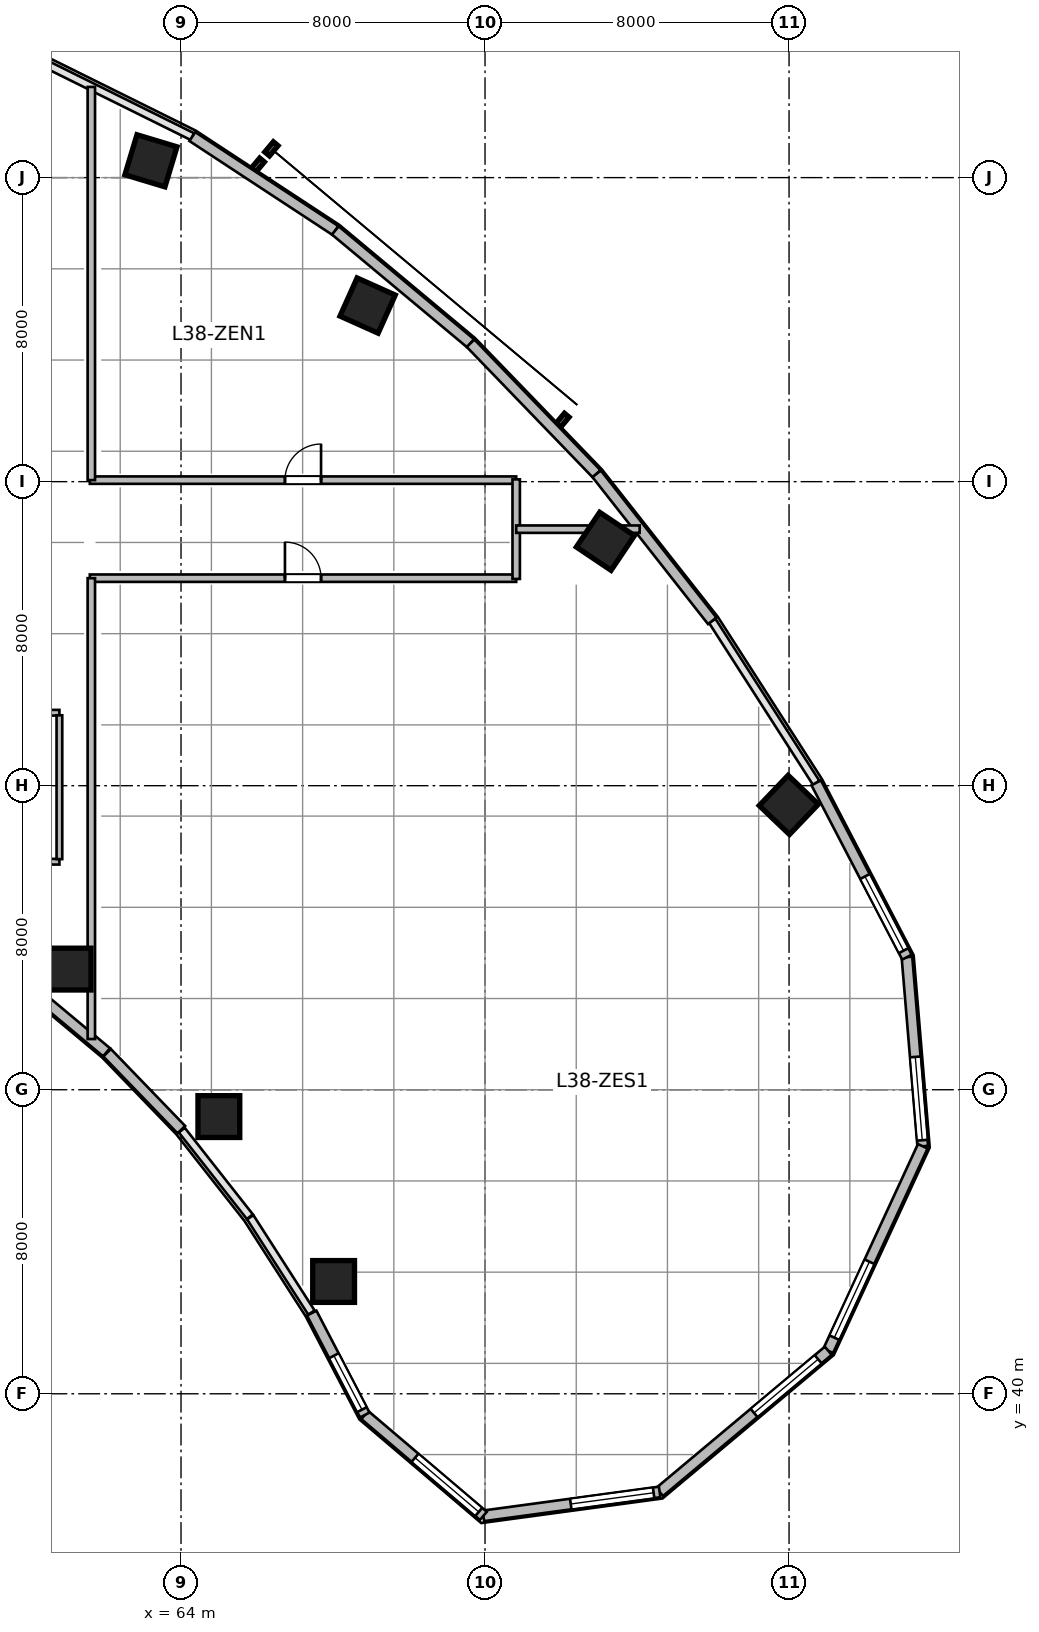
"""IFC4 building model, lengths in metres.
Left out: names, types, materials, properties, quantities, classifications, styles, units other than length and angle.
Written with IfcOpenShell. Run it as: python <this file> out.ifc"""

import sys

from ifc_helpers import new_model, si_unit, direction, frame, frame_2d, origin, origin_2d, place, context, subcontext, project, spatial, rectangle, circle, extrude, source, transform, mapped, element, fill, save


model = new_model("IFC4")
c1 = context("Model", 3, precision=1e-05, world=origin(), true_north=direction((0.0, 1.0)))
c2 = subcontext(c1, "Body", "Model", "MODEL_VIEW")
j1 = project(units=[si_unit("LENGTHUNIT", "METRE"), si_unit("PLANEANGLEUNIT", "RADIAN")], contexts=[c1])
p1 = place(None, origin())
s1 = spatial("IfcSite", under=j1, at=p1, CompositionType="ELEMENT")
p2 = place(p1, origin())
s2 = spatial("IfcBuilding", under=s1, at=p2, CompositionType="ELEMENT")
p3 = place(p2, frame((0.0, 0.0, 158.4)))
s3 = spatial("IfcBuildingStorey", under=s2, at=p3, CompositionType="ELEMENT", Elevation=158.4)
m1 = source(origin(), c2, "Body", "SweptSolid", [
    extrude(rectangle(XDim=1.1, YDim=1.1, at=origin_2d()), origin(), (0.0, 0.0, 1.0), 3.9),
])
p4 = place(p3, frame((63.209, 72.442, 0.0), z_axis=(0.0, 0.0, 1.0), x_axis=(0.288697611798, 0.957420330337, 0.0)))
e1 = element("IfcColumn", 1, at=p4, inside=s3, PredefinedType="COLUMN", context=c2, shape_type="MappedRepresentation", body=[
    mapped(m1, transform((0.0, 0.0, 0.0), scale=1.0)),
])
m2 = source(origin(), c2, "Body", "SweptSolid", [
    extrude(circle(Radius=0.55, at=origin_2d()), origin(), (0.0, 0.0, 1.0), 3.9),
])
p5 = place(p3, frame((61.082, 51.175, 0.0), z_axis=(0.0, 0.0, 1.0), x_axis=(0.409126902895, 0.912477494148, 0.0)))
e2 = element("IfcColumn", 2, at=p5, inside=s3, PredefinedType="COLUMN", context=c2, shape_type="MappedRepresentation", body=[
    mapped(m2, transform((0.0, 0.0, 0.0), scale=1.0)),
])
p6 = place(p3, frame((68.91, 68.633, 0.0), z_axis=(0.0, 0.0, 1.0), x_axis=(0.409126902895, 0.912477494148, 0.0)))
e3 = element("IfcColumn", 3, at=p6, inside=s3, PredefinedType="COLUMN", context=c2, shape_type="MappedRepresentation", body=[
    mapped(m1, transform((0.0, 0.0, 0.0), scale=1.0)),
])
p7 = place(p3, frame((64.996, 47.294, 0.0), z_axis=(0.0, 0.0, 1.0), x_axis=(0.55774510898, 0.830012285095, 0.0)))
e4 = element("IfcColumn", 4, at=p7, inside=s3, PredefinedType="COLUMN", context=c2, shape_type="MappedRepresentation", body=[
    mapped(m2, transform((0.0, 0.0, 0.0), scale=1.0)),
])
p8 = place(p3, frame((75.167, 62.43, 0.0), z_axis=(0.0, 0.0, 1.0), x_axis=(0.55774510898, 0.830012285095, 0.0)))
e5 = element("IfcColumn", 5, at=p8, inside=s3, PredefinedType="COLUMN", context=c2, shape_type="MappedRepresentation", body=[
    mapped(m1, transform((0.0, 0.0, 0.0), scale=1.0)),
])
p9 = place(p3, frame((68.015, 42.955, 0.0), z_axis=(0.0, 0.0, 1.0), x_axis=(0.690756218984, 0.723087716626, 0.0)))
e6 = element("IfcColumn", 6, at=p9, inside=s3, PredefinedType="COLUMN", context=c2, shape_type="MappedRepresentation", body=[
    mapped(m2, transform((0.0, 0.0, 0.0), scale=1.0)),
])
p10 = place(p3, frame((79.993, 55.494, 0.0), z_axis=(0.0, 0.0, 1.0), x_axis=(0.690756218984, 0.723087716626, 0.0)))
e7 = element("IfcColumn", 7, at=p10, inside=s3, PredefinedType="COLUMN", context=c2, shape_type="MappedRepresentation", body=[
    mapped(m1, transform((0.0, 0.0, 0.0), scale=1.0)),
])
m3 = source(origin(), c2, "Body", "SweptSolid", [
    extrude(rectangle(XDim=4.994, YDim=0.28, at=frame_2d((2.497, 0.0))), origin(), (0.0, 0.0, 1.0), 3.65),
])
p11 = place(p3, frame((83.102, 51.489, 0.0), z_axis=(0.0, 0.0, 1.0), x_axis=(0.083344839916, -0.996520766296, 0.0)))
e8 = element("IfcWall", 8, at=p11, inside=s3, PredefinedType="SOLIDWALL", context=c2, shape_type="MappedRepresentation", body=[
    mapped(m3, transform((0.0, 0.0, 0.0), scale=1.0)),
])
p12 = place(p11, frame((2.635, 0.0, 0.95)))
e9 = element("IfcOpeningElement", 9, at=p12, cuts=e8, PredefinedType="OPENING", context=c2, shape_type="SweptSolid", body=[
    extrude(rectangle(XDim=2.2, YDim=2.1, at=frame_2d((1.1, 1.05))), frame((0.0, 0.15, 0.0), z_axis=(0.0, -1.0, 0.0), x_axis=(1.0, 0.0, 0.0)), (0.0, 0.0, 1.0), 0.3),
])
m4 = source(origin(), c2, "Body", "SweptSolid", [
    extrude(rectangle(XDim=5.927, YDim=0.28, at=frame_2d((2.964, 0.0))), origin(), (0.0, 0.0, 1.0), 3.65),
])
p13 = place(p3, frame((83.519, 46.512, 0.0), z_axis=(0.0, 0.0, 1.0), x_axis=(-0.419656204795, -0.907683132914, 0.0)))
e10 = element("IfcWall", 10, at=p13, inside=s3, PredefinedType="SOLIDWALL", context=c2, shape_type="MappedRepresentation", body=[
    mapped(m4, transform((0.0, 0.0, 0.0), scale=1.0)),
])
p14 = place(p13, frame((3.346, 0.0, 0.95)))
e11 = element("IfcOpeningElement", 11, at=p14, cuts=e10, PredefinedType="OPENING", context=c2, shape_type="SweptSolid", body=[
    extrude(rectangle(XDim=2.2, YDim=2.1, at=frame_2d((1.1, 1.05))), frame((0.0, 0.15, 0.0), z_axis=(0.0, -1.0, 0.0), x_axis=(1.0, 0.0, 0.0)), (0.0, 0.0, 1.0), 0.3),
])
m5 = source(origin(), c2, "Body", "SweptSolid", [
    extrude(rectangle(XDim=5.786, YDim=0.28, at=frame_2d((2.893, 0.0))), origin(), (0.0, 0.0, 1.0), 3.65),
])
p15 = place(p3, frame((81.031, 41.131, 0.0), z_axis=(0.0, 0.0, 1.0), x_axis=(-0.766711306852, -0.641992034176, 0.0)))
e12 = element("IfcWall", 12, at=p15, inside=s3, PredefinedType="SOLIDWALL", context=c2, shape_type="MappedRepresentation", body=[
    mapped(m5, transform((0.0, 0.0, 0.0), scale=1.0)),
])
p16 = place(p15, frame((0.347, 0.0, 0.95)))
e13 = element("IfcOpeningElement", 13, at=p16, cuts=e12, PredefinedType="OPENING", context=c2, shape_type="SweptSolid", body=[
    extrude(rectangle(XDim=2.2, YDim=2.1, at=frame_2d((1.1, 1.05))), frame((0.0, 0.15, 0.0), z_axis=(0.0, -1.0, 0.0), x_axis=(1.0, 0.0, 0.0)), (0.0, 0.0, 1.0), 0.3),
])
m6 = source(origin(), c2, "Body", "SweptSolid", [
    extrude(rectangle(XDim=4.68, YDim=0.28, at=frame_2d((2.34, 0.0))), origin(), (0.0, 0.0, 1.0), 3.65),
])
p17 = place(p3, frame((76.594, 37.417, 0.0), z_axis=(0.0, 0.0, 1.0), x_axis=(-0.990931146435, -0.134370618162, 0.0)))
e14 = element("IfcWall", 14, at=p17, inside=s3, PredefinedType="SOLIDWALL", context=c2, shape_type="MappedRepresentation", body=[
    mapped(m6, transform((0.0, 0.0, 0.0), scale=1.0)),
])
p18 = place(p17, frame((0.16, 0.0, 0.95)))
e15 = element("IfcOpeningElement", 15, at=p18, cuts=e14, PredefinedType="OPENING", context=c2, shape_type="SweptSolid", body=[
    extrude(rectangle(XDim=2.2, YDim=2.1, at=frame_2d((1.1, 1.05))), frame((0.0, 0.15, 0.0), z_axis=(0.0, -1.0, 0.0), x_axis=(1.0, 0.0, 0.0)), (0.0, 0.0, 1.0), 0.3),
])
m7 = source(origin(), c2, "Body", "SweptSolid", [
    extrude(rectangle(XDim=4.096, YDim=0.28, at=frame_2d((2.048, 0.0))), origin(), (0.0, 0.0, 1.0), 3.65),
])
p19 = place(p3, frame((71.957, 36.788, 0.0), z_axis=(0.0, 0.0, 1.0), x_axis=(-0.761926081737, 0.647663991564, 0.0)))
e16 = element("IfcWall", 16, at=p19, inside=s3, PredefinedType="SOLIDWALL", context=c2, shape_type="MappedRepresentation", body=[
    mapped(m7, transform((0.0, 0.0, 0.0), scale=1.0)),
])
p20 = place(p19, frame((0.16, 0.0, 0.95)))
e17 = element("IfcOpeningElement", 17, at=p20, cuts=e16, PredefinedType="OPENING", context=c2, shape_type="SweptSolid", body=[
    extrude(rectangle(XDim=2.2, YDim=2.1, at=frame_2d((1.1, 1.05))), frame((0.0, 0.15, 0.0), z_axis=(0.0, -1.0, 0.0), x_axis=(1.0, 0.0, 0.0)), (0.0, 0.0, 1.0), 0.3),
])
m8 = source(origin(), c2, "Body", "SweptSolid", [
    extrude(rectangle(XDim=3.024, YDim=0.28, at=frame_2d((1.512, 0.0))), origin(), (0.0, 0.0, 1.0), 3.65),
])
p21 = place(p3, frame((68.836, 39.44, 0.0), z_axis=(0.0, 0.0, 1.0), x_axis=(-0.461718746531, 0.887026380161, 0.0)))
e18 = element("IfcWall", 18, at=p21, inside=s3, PredefinedType="SOLIDWALL", context=c2, shape_type="MappedRepresentation", body=[
    mapped(m8, transform((0.0, 0.0, 0.0), scale=1.0)),
])
p22 = place(p21, frame((0.16, 0.0, 0.95)))
e19 = element("IfcOpeningElement", 19, at=p22, cuts=e18, PredefinedType="OPENING", context=c2, shape_type="SweptSolid", body=[
    extrude(rectangle(XDim=1.6, YDim=1.9, at=frame_2d((0.8, 0.95))), frame((0.0, 0.15, 0.0), z_axis=(0.0, -1.0, 0.0), x_axis=(1.0, 0.0, 0.0)), (0.0, 0.0, 1.0), 0.3),
])
m9 = source(origin(), c2, "Body", "SweptSolid", [
    extrude(rectangle(XDim=2.812, YDim=0.28, at=frame_2d((1.406, 0.0))), origin(), (0.0, 0.0, 1.0), 3.65),
])
p23 = place(p3, frame((64.008, 46.95, 0.0), z_axis=(0.0, 0.0, 1.0), x_axis=(-0.694583668785, 0.719411931411, 0.0)))
e20 = element("IfcWall", 20, at=p23, inside=s3, PredefinedType="SOLIDWALL", context=c2, shape_type="MappedRepresentation", body=[
    mapped(m9, transform((0.0, 0.0, 0.0), scale=1.0)),
])
m10 = source(origin(), c2, "Body", "SweptSolid", [
    extrude(rectangle(XDim=2.729, YDim=0.28, at=frame_2d((1.365, 0.0))), origin(), (0.0, 0.0, 1.0), 3.65),
])
p24 = place(p3, frame((62.041, 48.987, 0.0), z_axis=(0.0, 0.0, 1.0), x_axis=(-0.767957284255, 0.640501061326, 0.0)))
e21 = element("IfcWall", 21, at=p24, inside=s3, PredefinedType="SOLIDWALL", context=c2, shape_type="MappedRepresentation", body=[
    mapped(m10, transform((0.0, 0.0, 0.0), scale=1.0)),
])
m11 = source(origin(), c2, "Body", "SweptSolid", [
    extrude(rectangle(XDim=4.501, YDim=0.28, at=frame_2d((2.25, 0.0))), origin(), (0.0, 0.0, 1.0), 3.65),
])
p25 = place(p3, frame((64.298, 73.08, 0.0), z_axis=(0.0, 0.0, 1.0), x_axis=(0.835984920737, -0.548752414391, 0.0)))
e22 = element("IfcWall", 22, at=p25, inside=s3, PredefinedType="SOLIDWALL", context=c2, shape_type="MappedRepresentation", body=[
    mapped(m11, transform((0.0, 0.0, 0.0), scale=1.0)),
])
m12 = source(origin(), c2, "Body", "SweptSolid", [
    extrude(rectangle(XDim=4.634, YDim=0.28, at=frame_2d((2.317, 0.0))), origin(), (0.0, 0.0, 1.0), 3.65),
])
p26 = place(p3, frame((68.061, 70.61, 0.0), z_axis=(0.0, 0.0, 1.0), x_axis=(0.767910229096, -0.640557475993, 0.0)))
e23 = element("IfcWall", 23, at=p26, inside=s3, PredefinedType="SOLIDWALL", context=c2, shape_type="MappedRepresentation", body=[
    mapped(m12, transform((0.0, 0.0, 0.0), scale=1.0)),
])
m13 = source(origin(), c2, "Body", "SweptSolid", [
    extrude(rectangle(XDim=4.776, YDim=0.28, at=frame_2d((2.388, 0.0))), origin(), (0.0, 0.0, 1.0), 3.65),
])
p27 = place(p3, frame((71.619, 67.642, 0.0), z_axis=(0.0, 0.0, 1.0), x_axis=(0.694601811851, -0.719394414055, 0.0)))
e24 = element("IfcWall", 24, at=p27, inside=s3, PredefinedType="SOLIDWALL", context=c2, shape_type="MappedRepresentation", body=[
    mapped(m13, transform((0.0, 0.0, 0.0), scale=1.0)),
])
m14 = source(origin(), c2, "Body", "SweptSolid", [
    extrude(rectangle(XDim=4.922, YDim=0.28, at=frame_2d((2.461, 0.0))), origin(), (0.0, 0.0, 1.0), 3.65),
])
p28 = place(p3, frame((74.936, 64.206, 0.0), z_axis=(0.0, 0.0, 1.0), x_axis=(0.61817639101, -0.786039407153, 0.0)))
e25 = element("IfcWall", 25, at=p28, inside=s3, PredefinedType="SOLIDWALL", context=c2, shape_type="MappedRepresentation", body=[
    mapped(m14, transform((0.0, 0.0, 0.0), scale=1.0)),
])
m15 = source(origin(), c2, "Body", "SweptSolid", [
    extrude(rectangle(XDim=5.171, YDim=0.28, at=frame_2d((2.585, 0.0))), origin(), (0.0, 0.0, 1.0), 3.65),
])
p29 = place(p3, frame((80.715, 56.075, 0.0), z_axis=(0.0, 0.0, 1.0), x_axis=(0.461752581363, -0.887008767491, 0.0)))
e26 = element("IfcWall", 26, at=p29, inside=s3, PredefinedType="SOLIDWALL", context=c2, shape_type="MappedRepresentation", body=[
    mapped(m15, transform((0.0, 0.0, 0.0), scale=1.0)),
])
p30 = place(p29, frame((2.778, 0.0, 0.95)))
e27 = element("IfcOpeningElement", 27, at=p30, cuts=e26, PredefinedType="OPENING", context=c2, shape_type="SweptSolid", body=[
    extrude(rectangle(XDim=2.2, YDim=2.1, at=frame_2d((1.1, 1.05))), frame((0.0, 0.15, 0.0), z_axis=(0.0, -1.0, 0.0), x_axis=(1.0, 0.0, 0.0)), (0.0, 0.0, 1.0), 0.3),
])
m16 = source(origin(), c2, "Body", "SweptSolid", [
    extrude(rectangle(XDim=6.6, YDim=0.15, at=frame_2d((3.3, 0.0))), origin(), (0.0, 0.0, 1.0), 3.095),
])
p31 = place(p3, frame((54.2, 54.0, 0.0), z_axis=(0.0, 0.0, 1.0), x_axis=(1.0, 0.0, 0.0)))
e28 = element("IfcWall", 28, at=p31, inside=s3, PredefinedType="PARTITIONING", context=c2, shape_type="MappedRepresentation", body=[
    mapped(m16, transform((0.0, 0.0, 0.0), scale=1.0)),
])
m17 = source(origin(), c2, "Body", "SweptSolid", [
    extrude(rectangle(XDim=6.6, YDim=0.15, at=frame_2d((3.3, 0.0))), origin(), (0.0, 0.0, 1.0), 3.65),
])
p32 = place(p3, frame((54.2, 57.92, 0.0), z_axis=(0.0, 0.0, 1.0), x_axis=(1.0, 0.0, 0.0)))
e29 = element("IfcWall", 29, at=p32, inside=s3, PredefinedType="PARTITIONING", context=c2, shape_type="MappedRepresentation", body=[
    mapped(m17, transform((0.0, 0.0, 0.0), scale=1.0)),
])
p33 = place(p32, frame((2.825, 0.0, 0.0)))
e30 = element("IfcOpeningElement", 30, at=p33, cuts=e29, PredefinedType="OPENING", context=c2, shape_type="SweptSolid", body=[
    extrude(rectangle(XDim=0.95, YDim=2.1, at=frame_2d((0.475, 1.05))), frame((0.0, 0.085, 0.0), z_axis=(0.0, -1.0, 0.0), x_axis=(1.0, 0.0, 0.0)), (0.0, 0.0, 1.0), 0.17),
])
m18 = source(origin(), c2, "Body", "SweptSolid", [
    extrude(rectangle(XDim=3.785, YDim=0.15, at=frame_2d((1.893, 0.0))), origin(), (0.0, 0.0, 1.0), 3.65),
])
p34 = place(p3, frame((60.8, 54.067, 0.0), z_axis=(0.0, 0.0, 1.0), x_axis=(0.0, 1.0, 0.0)))
e31 = element("IfcWall", 31, at=p34, inside=s3, PredefinedType="PARTITIONING", context=c2, shape_type="MappedRepresentation", body=[
    mapped(m18, transform((0.0, 0.0, 0.0), scale=1.0)),
])
m19 = source(origin(), c2, "Body", "SweptSolid", [
    extrude(rectangle(XDim=11.22, YDim=0.195, at=frame_2d((5.61, 0.0))), origin(), (0.0, 0.0, 1.0), 3.65),
])
p35 = place(p3, frame((61.6, 64.04, 0.0), z_axis=(0.0, 0.0, 1.0), x_axis=(1.0, 0.0, 0.0)))
e32 = element("IfcWall", 32, at=p35, inside=s3, PredefinedType="PARTITIONING", context=c2, shape_type="MappedRepresentation", body=[
    mapped(m19, transform((0.0, 0.0, 0.0), scale=1.0)),
])
p36 = place(p35, frame((5.135, 0.0, 0.0)))
e33 = element("IfcOpeningElement", 33, at=p36, cuts=e32, PredefinedType="OPENING", context=c2, shape_type="SweptSolid", body=[
    extrude(rectangle(XDim=0.95, YDim=2.1, at=frame_2d((0.475, 1.05))), frame((0.0, 0.107, 0.0), z_axis=(0.0, -1.0, 0.0), x_axis=(1.0, 0.0, 0.0)), (0.0, 0.0, 1.0), 0.215),
])
p37 = place(p3, frame((61.6, 61.46, 0.0), z_axis=(0.0, 0.0, 1.0), x_axis=(1.0, 0.0, 0.0)))
e34 = element("IfcWall", 34, at=p37, inside=s3, PredefinedType="PARTITIONING", context=c2, shape_type="MappedRepresentation", body=[
    mapped(m19, transform((0.0, 0.0, 0.0), scale=1.0)),
])
p38 = place(p37, frame((5.135, 0.0, 0.0)))
e35 = element("IfcOpeningElement", 35, at=p38, cuts=e34, PredefinedType="OPENING", context=c2, shape_type="SweptSolid", body=[
    extrude(rectangle(XDim=0.95, YDim=2.1, at=frame_2d((0.475, 1.05))), frame((0.0, 0.107, 0.0), z_axis=(0.0, -1.0, 0.0), x_axis=(1.0, 0.0, 0.0)), (0.0, 0.0, 1.0), 0.215),
])
m20 = source(origin(), c2, "Body", "SweptSolid", [
    extrude(rectangle(XDim=12.126, YDim=0.195, at=frame_2d((6.063, 0.0))), origin(), (0.0, 0.0, 1.0), 2.942),
])
p39 = place(p3, frame((61.64, 49.334, 0.0), z_axis=(0.0, 0.0, 1.0), x_axis=(0.0, 1.0, 0.0)))
e36 = element("IfcWall", 36, at=p39, inside=s3, PredefinedType="PARTITIONING", context=c2, shape_type="MappedRepresentation", body=[
    mapped(m20, transform((0.0, 0.0, 0.0), scale=1.0)),
])
m21 = source(origin(), c2, "Body", "SweptSolid", [
    extrude(rectangle(XDim=10.346, YDim=0.195, at=frame_2d((5.173, 0.0))), origin(), (0.0, 0.0, 1.0), 3.65),
])
p40 = place(p3, frame((61.64, 64.04, 0.0), z_axis=(0.0, 0.0, 1.0), x_axis=(0.0, 1.0, 0.0)))
e37 = element("IfcWall", 37, at=p40, inside=s3, PredefinedType="PARTITIONING", context=c2, shape_type="MappedRepresentation", body=[
    mapped(m21, transform((0.0, 0.0, 0.0), scale=1.0)),
])
m22 = source(origin(), c2, "Body", "SweptSolid", [
    extrude(rectangle(XDim=2.62, YDim=0.195, at=frame_2d((1.31, 0.0))), origin(), (0.0, 0.0, 1.0), 3.022),
])
p41 = place(p3, frame((72.82, 61.44, 0.0), z_axis=(0.0, 0.0, 1.0), x_axis=(0.0, 1.0, 0.0)))
e38 = element("IfcWall", 38, at=p41, inside=s3, PredefinedType="PARTITIONING", context=c2, shape_type="MappedRepresentation", body=[
    mapped(m22, transform((0.0, 0.0, 0.0), scale=1.0)),
])
m23 = source(origin(), c2, "Body", "SweptSolid", [
    extrude(rectangle(XDim=3.249, YDim=0.195, at=frame_2d((1.625, 0.0))), origin(), (0.0, 0.0, 1.0), 3.65),
])
p42 = place(p3, frame((72.82, 62.75, 0.0), z_axis=(0.0, 0.0, 1.0), x_axis=(1.0, 0.0, 0.0)))
e39 = element("IfcWall", 39, at=p42, inside=s3, PredefinedType="PARTITIONING", context=c2, shape_type="MappedRepresentation", body=[
    mapped(m23, transform((0.0, 0.0, 0.0), scale=1.0)),
])
m24 = source(origin(), c2, "Body", "SweptSolid", [
    extrude(rectangle(XDim=2.2, YDim=2.1, at=frame_2d((1.1, 1.05))), frame((0.0, 0.03, 0.0), z_axis=(0.0, -1.0, 0.0), x_axis=(1.0, 0.0, 0.0)), (0.0, 0.0, 1.0), 0.06),
])
p43 = place(p12, origin())
e40 = element("IfcWindow", 40, at=p43, inside=s3, PartitioningType="TRIPLE_PANEL_VERTICAL", PredefinedType="WINDOW", context=c2, shape_type="MappedRepresentation", body=[
    mapped(m24, transform((0.0, 0.0, 0.0), scale=1.0)),
])
fill(e9, e40)
p44 = place(p14, origin())
e41 = element("IfcWindow", 41, at=p44, inside=s3, PartitioningType="TRIPLE_PANEL_VERTICAL", PredefinedType="WINDOW", context=c2, shape_type="MappedRepresentation", body=[
    mapped(m24, transform((0.0, 0.0, 0.0), scale=1.0)),
])
fill(e11, e41)
p45 = place(p16, origin())
e42 = element("IfcWindow", 42, at=p45, inside=s3, PartitioningType="TRIPLE_PANEL_VERTICAL", PredefinedType="WINDOW", context=c2, shape_type="MappedRepresentation", body=[
    mapped(m24, transform((0.0, 0.0, 0.0), scale=1.0)),
])
fill(e13, e42)
p46 = place(p18, origin())
e43 = element("IfcWindow", 43, at=p46, inside=s3, PartitioningType="TRIPLE_PANEL_VERTICAL", PredefinedType="WINDOW", context=c2, shape_type="MappedRepresentation", body=[
    mapped(m24, transform((0.0, 0.0, 0.0), scale=1.0)),
])
fill(e15, e43)
p47 = place(p20, origin())
e44 = element("IfcWindow", 44, at=p47, inside=s3, PartitioningType="TRIPLE_PANEL_VERTICAL", PredefinedType="WINDOW", context=c2, shape_type="MappedRepresentation", body=[
    mapped(m24, transform((0.0, 0.0, 0.0), scale=1.0)),
])
fill(e17, e44)
m25 = source(origin(), c2, "Body", "SweptSolid", [
    extrude(rectangle(XDim=1.6, YDim=1.9, at=frame_2d((0.8, 0.95))), frame((0.0, 0.03, 0.0), z_axis=(0.0, -1.0, 0.0), x_axis=(1.0, 0.0, 0.0)), (0.0, 0.0, 1.0), 0.06),
])
p48 = place(p22, origin())
e45 = element("IfcWindow", 45, at=p48, inside=s3, PartitioningType="SINGLE_PANEL", PredefinedType="WINDOW", context=c2, shape_type="MappedRepresentation", body=[
    mapped(m25, transform((0.0, 0.0, 0.0), scale=1.0)),
])
fill(e19, e45)
p49 = place(p30, origin())
e46 = element("IfcWindow", 46, at=p49, inside=s3, PartitioningType="TRIPLE_PANEL_VERTICAL", PredefinedType="WINDOW", context=c2, shape_type="MappedRepresentation", body=[
    mapped(m24, transform((0.0, 0.0, 0.0), scale=1.0)),
])
fill(e27, e46)
m26 = source(origin(), c2, "Body", "SweptSolid", [
    extrude(rectangle(XDim=0.95, YDim=2.1, at=frame_2d((0.475, 1.05))), frame((0.0, 0.025, 0.0), z_axis=(0.0, -1.0, 0.0), x_axis=(1.0, 0.0, 0.0)), (0.0, 0.0, 1.0), 0.05),
])
p50 = place(p36, origin())
e47 = element("IfcDoor", 47, at=p50, inside=s3, OperationType="SINGLE_SWING_RIGHT", PredefinedType="DOOR", context=c2, shape_type="MappedRepresentation", body=[
    mapped(m26, transform((0.0, 0.0, 0.0), scale=1.0)),
])
fill(e33, e47)
p51 = place(p38, origin())
e48 = element("IfcDoor", 48, at=p51, inside=s3, OperationType="SINGLE_SWING_LEFT", PredefinedType="DOOR", context=c2, shape_type="MappedRepresentation", body=[
    mapped(m26, transform((0.0, 0.0, 0.0), scale=1.0)),
])
fill(e35, e48)
save(model, sys.argv[1])
